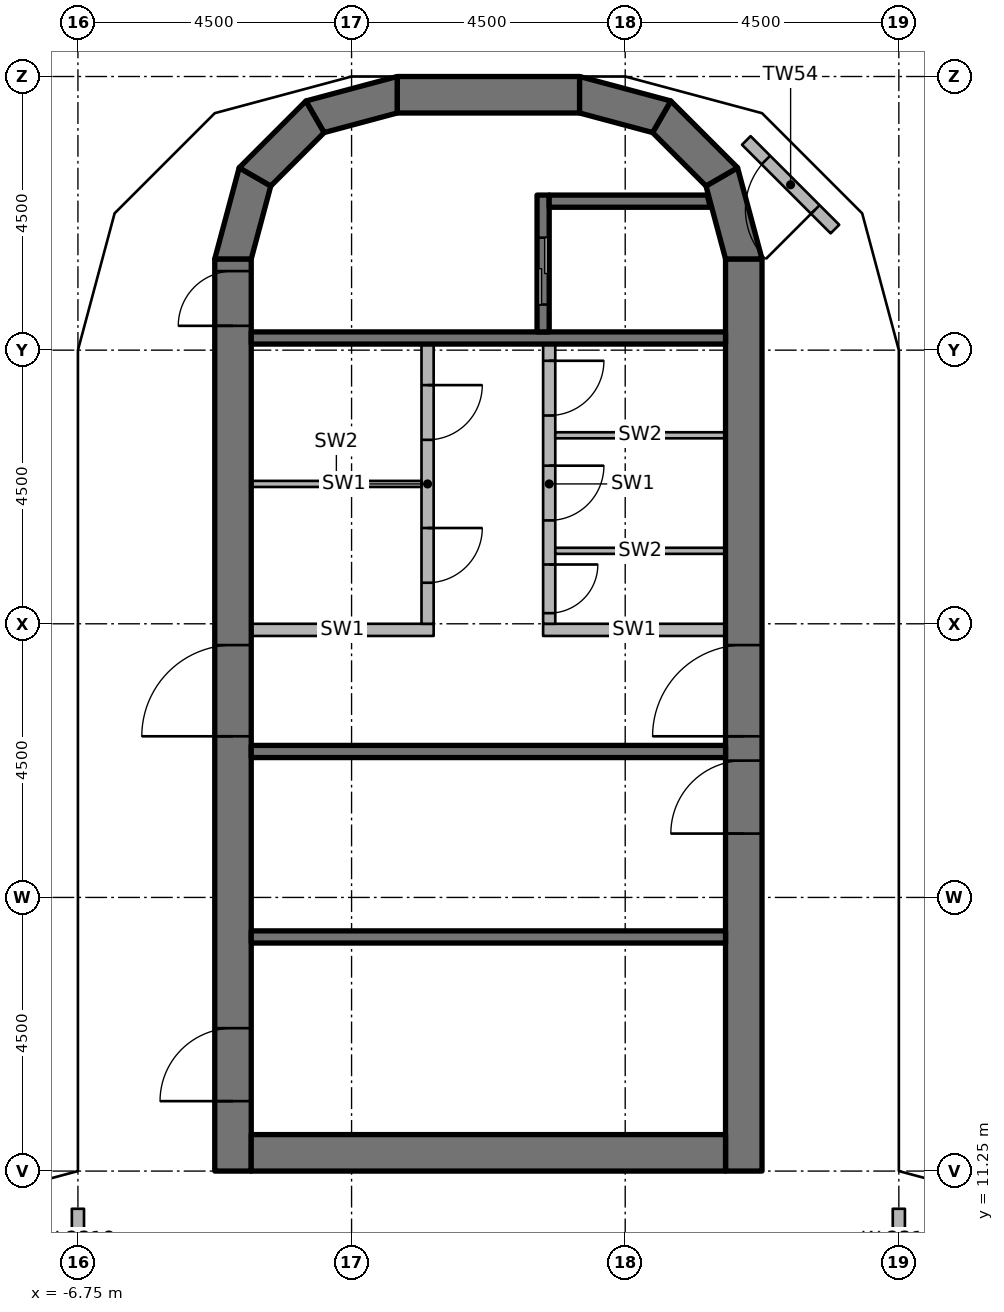
"""IFC4 building model, lengths in metres.
Left out: names, types, materials, properties, quantities, classifications, styles, units other than length and angle.
Written with IfcOpenShell. Run it as: python <this file> out.ifc"""

import sys

from ifc_helpers import new_model, si_unit, direction, frame, frame_2d, origin, origin_2d, place, context, subcontext, project, spatial, polyline, rectangle, outline, extrude, element, fill, save


model = new_model("IFC4")
c1 = context("Model", 3, precision=1e-05, world=origin(), true_north=direction((0.0, 1.0)))
c2 = subcontext(c1, "Body", "Model", "MODEL_VIEW")
j1 = project(units=[si_unit("LENGTHUNIT", "METRE"), si_unit("PLANEANGLEUNIT", "RADIAN")], contexts=[c1])
p1 = place(None, origin())
s1 = spatial("IfcSite", under=j1, at=p1, CompositionType="ELEMENT")
p2 = place(p1, origin())
s2 = spatial("IfcBuilding", under=s1, at=p2, CompositionType="ELEMENT")
p3 = place(p2, frame((0.0, 0.0, 218.2)))
s3 = spatial("IfcBuildingStorey", under=s2, at=p3, CompositionType="ELEMENT", Elevation=218.2)
for number, where, z_axis, x_axis in (
    (1, (-6.25, 10.75, 0.0), (0.0, 0.0, 1.0), (1.0, 0.0, 0.0)),
    (2, (-6.25, 15.75, 0.0), (0.0, 0.0, 1.0), (1.0, 0.0, 0.0)),
    (3, (-6.25, 20.25, 0.0), (0.0, 0.0, 1.0), (1.0, 0.0, 0.0)),
    (4, (-6.25, 24.65, 0.0), (0.0, 0.0, 1.0), (1.0, 0.0, 0.0)),
    (5, (6.25, 10.75, 0.0), (0.0, 0.0, 1.0), (1.0, 0.0, 0.0)),
    (6, (6.25, 15.75, 0.0), (0.0, 0.0, 1.0), (1.0, 0.0, 0.0)),
    (7, (6.25, 20.25, 0.0), (0.0, 0.0, 1.0), (1.0, 0.0, 0.0)),
    (8, (6.25, 24.65, 0.0), (0.0, 0.0, 1.0), (1.0, 0.0, 0.0)),
):
    element("IfcColumn", number, at=place(p3, frame(where, z_axis=z_axis, x_axis=x_axis)), inside=s3, PredefinedType="COLUMN", context=c2, shape_type="SweptSolid", body=[
        extrude(rectangle(XDim=0.7, YDim=0.7, at=origin_2d()), origin(), (0.0, 0.0, 1.0), 3.65),
    ])
p4 = place(p3, frame((-4.2, 11.25, 0.0), z_axis=(0.0, 0.0, 1.0), x_axis=(0.0, 1.0, 0.0)))
e9 = element("IfcWall", 9, at=p4, inside=s3, PredefinedType="SHEAR", context=c2, shape_type="SweptSolid", body=[
    extrude(rectangle(XDim=15.0, YDim=0.6, at=frame_2d((7.5, 0.0))), origin(), (0.0, 0.0, 1.0), 3.8),
])
p5 = place(p4, frame((7.15, 0.0, 0.0)))
e10 = element("IfcOpeningElement", 10, at=p5, cuts=e9, PredefinedType="OPENING", context=c2, shape_type="SweptSolid", body=[
    extrude(rectangle(XDim=1.5, YDim=2.3, at=frame_2d((0.75, 1.15))), frame((0.0, 0.31, 0.0), z_axis=(0.0, -1.0, 0.0), x_axis=(1.0, 0.0, 0.0)), (0.0, 0.0, 1.0), 0.62),
])
p6 = place(p4, frame((13.9, 0.0, 0.0)))
e11 = element("IfcOpeningElement", 11, at=p6, cuts=e9, PredefinedType="OPENING", context=c2, shape_type="SweptSolid", body=[
    extrude(rectangle(XDim=0.9, YDim=2.1, at=frame_2d((0.45, 1.05))), frame((0.0, 0.31, 0.0), z_axis=(0.0, -1.0, 0.0), x_axis=(1.0, 0.0, 0.0)), (0.0, 0.0, 1.0), 0.62),
])
p7 = place(p4, frame((1.15, 0.0, 0.0)))
e12 = element("IfcOpeningElement", 12, at=p7, cuts=e9, PredefinedType="OPENING", context=c2, shape_type="SweptSolid", body=[
    extrude(rectangle(XDim=1.2, YDim=2.1, at=frame_2d((0.6, 1.05))), frame((0.0, 0.31, 0.0), z_axis=(0.0, -1.0, 0.0), x_axis=(1.0, 0.0, 0.0)), (0.0, 0.0, 1.0), 0.62),
])
p8 = place(p3, frame((4.2, 11.25, 0.0), z_axis=(0.0, 0.0, 1.0), x_axis=(0.0, 1.0, 0.0)))
e13 = element("IfcWall", 13, at=p8, inside=s3, PredefinedType="SHEAR", context=c2, shape_type="SweptSolid", body=[
    extrude(rectangle(XDim=15.0, YDim=0.6, at=frame_2d((7.5, 0.0))), origin(), (0.0, 0.0, 1.0), 3.8),
])
p9 = place(p8, frame((7.15, 0.0, 0.0)))
e14 = element("IfcOpeningElement", 14, at=p9, cuts=e13, PredefinedType="OPENING", context=c2, shape_type="SweptSolid", body=[
    extrude(rectangle(XDim=1.5, YDim=2.3, at=frame_2d((0.75, 1.15))), frame((0.0, 0.31, 0.0), z_axis=(0.0, -1.0, 0.0), x_axis=(1.0, 0.0, 0.0)), (0.0, 0.0, 1.0), 0.62),
])
p10 = place(p8, frame((5.55, 0.0, 0.0)))
e15 = element("IfcOpeningElement", 15, at=p10, cuts=e13, PredefinedType="OPENING", context=c2, shape_type="SweptSolid", body=[
    extrude(rectangle(XDim=1.2, YDim=2.1, at=frame_2d((0.6, 1.05))), frame((0.0, 0.31, 0.0), z_axis=(0.0, -1.0, 0.0), x_axis=(1.0, 0.0, 0.0)), (0.0, 0.0, 1.0), 0.62),
])
p11 = place(p3, frame((-3.9, 11.55, 0.0), z_axis=(0.0, 0.0, 1.0), x_axis=(1.0, 0.0, 0.0)))
e16 = element("IfcWall", 16, at=p11, inside=s3, PredefinedType="SHEAR", context=c2, shape_type="SweptSolid", body=[
    extrude(rectangle(XDim=7.8, YDim=0.6, at=frame_2d((3.9, 0.0))), origin(), (0.0, 0.0, 1.0), 3.8),
])
p12 = place(p3, frame((-1.5, 28.95, 0.0), z_axis=(0.0, 0.0, 1.0), x_axis=(1.0, 0.0, 0.0)))
e17 = element("IfcWall", 17, at=p12, inside=s3, PredefinedType="SHEAR", context=c2, shape_type="SweptSolid", body=[
    extrude(rectangle(XDim=3.0, YDim=0.6, at=frame_2d((1.5, 0.0))), origin(), (0.0, 0.0, 1.0), 3.8),
])
p13 = place(p3, origin())
e18 = element("IfcWall", 18, at=p13, inside=s3, PredefinedType="SHEAR", context=c2, shape_type="SweptSolid", body=[
    extrude(outline(polyline([(-4.5, 26.25), (-4.098, 27.75), (-3.579, 27.45), (-3.9, 26.25), (-4.5, 26.25)])), origin(), (0.0, 0.0, 1.0), 3.8),
])
p14 = place(p3, origin())
e19 = element("IfcWall", 19, at=p14, inside=s3, PredefinedType="SHEAR", context=c2, shape_type="SweptSolid", body=[
    extrude(outline(polyline([(-4.098, 27.75), (-3.0, 28.848), (-2.7, 28.329), (-3.579, 27.45), (-4.098, 27.75)])), origin(), (0.0, 0.0, 1.0), 3.8),
])
p15 = place(p3, origin())
e20 = element("IfcWall", 20, at=p15, inside=s3, PredefinedType="SHEAR", context=c2, shape_type="SweptSolid", body=[
    extrude(outline(polyline([(-3.0, 28.848), (-1.5, 29.25), (-1.5, 28.65), (-2.7, 28.329), (-3.0, 28.848)])), origin(), (0.0, 0.0, 1.0), 3.8),
])
p16 = place(p3, origin())
e21 = element("IfcWall", 21, at=p16, inside=s3, PredefinedType="SHEAR", context=c2, shape_type="SweptSolid", body=[
    extrude(outline(polyline([(4.5, 26.25), (4.098, 27.75), (3.579, 27.45), (3.9, 26.25), (4.5, 26.25)])), origin(), (0.0, 0.0, 1.0), 3.8),
])
p17 = place(p3, origin())
e22 = element("IfcWall", 22, at=p17, inside=s3, PredefinedType="SHEAR", context=c2, shape_type="SweptSolid", body=[
    extrude(outline(polyline([(4.098, 27.75), (3.0, 28.848), (2.7, 28.329), (3.579, 27.45), (4.098, 27.75)])), origin(), (0.0, 0.0, 1.0), 3.8),
])
p18 = place(p3, origin())
e23 = element("IfcWall", 23, at=p18, inside=s3, PredefinedType="SHEAR", context=c2, shape_type="SweptSolid", body=[
    extrude(outline(polyline([(3.0, 28.848), (1.5, 29.25), (1.5, 28.65), (2.7, 28.329), (3.0, 28.848)])), origin(), (0.0, 0.0, 1.0), 3.8),
])
p19 = place(p3, frame((5.699, 26.741, 0.0), z_axis=(0.0, 0.0, 1.0), x_axis=(-0.707106781187, 0.707106781187, 0.0)))
e24 = element("IfcWall", 24, at=p19, inside=s3, PredefinedType="SOLIDWALL", context=c2, shape_type="SweptSolid", body=[
    extrude(rectangle(XDim=2.061, YDim=0.2, at=frame_2d((1.031, 0.0))), origin(), (0.0, 0.0, 1.0), 2.75),
])
p20 = place(p19, frame((0.456, 0.0, 0.0)))
e25 = element("IfcOpeningElement", 25, at=p20, cuts=e24, PredefinedType="OPENING", context=c2, shape_type="SweptSolid", body=[
    extrude(rectangle(XDim=1.15, YDim=2.4, at=frame_2d((0.575, 1.2))), frame((0.0, 0.11, 0.0), z_axis=(0.0, -1.0, 0.0), x_axis=(1.0, 0.0, 0.0)), (0.0, 0.0, 1.0), 0.22),
])
p21 = place(p3, frame((-3.9, 24.95, 0.0), z_axis=(0.0, 0.0, 1.0), x_axis=(1.0, 0.0, 0.0)))
e26 = element("IfcWall", 26, at=p21, inside=s3, PredefinedType="SHEAR", context=c2, shape_type="SweptSolid", body=[
    extrude(rectangle(XDim=7.8, YDim=0.2, at=frame_2d((3.9, 0.0))), origin(), (0.0, 0.0, 1.0), 3.65),
])
p22 = place(p3, frame((0.9, 27.3, 0.0), z_axis=(0.0, 0.0, 1.0), x_axis=(0.0, -1.0, 0.0)))
e27 = element("IfcWall", 27, at=p22, inside=s3, PredefinedType="SHEAR", context=c2, shape_type="SweptSolid", body=[
    extrude(rectangle(XDim=2.25, YDim=0.2, at=frame_2d((1.125, 0.0))), origin(), (0.0, 0.0, 1.0), 3.65),
])
p23 = place(p22, frame((0.7, 0.0, 0.0)))
e28 = element("IfcOpeningElement", 28, at=p23, cuts=e27, PredefinedType="OPENING", context=c2, shape_type="SweptSolid", body=[
    extrude(rectangle(XDim=1.1, YDim=2.3, at=frame_2d((0.55, 1.15))), frame((0.0, 0.11, 0.0), z_axis=(0.0, -1.0, 0.0), x_axis=(1.0, 0.0, 0.0)), (0.0, 0.0, 1.0), 0.22),
])
p24 = place(p3, origin())
e29 = element("IfcWall", 29, at=p24, inside=s3, PredefinedType="SHEAR", context=c2, shape_type="SweptSolid", body=[
    extrude(outline(polyline([(1.0, 27.1), (3.651, 27.1), (3.597, 27.3), (1.0, 27.3), (1.0, 27.1)])), origin(), (0.0, 0.0, 1.0), 3.65),
])
for number, where, z_axis, x_axis in (
    (30, (-3.9, 18.15, 0.0), (0.0, 0.0, 1.0), (1.0, 0.0, 0.0)),
    (31, (-3.9, 15.1, 0.0), (0.0, 0.0, 1.0), (1.0, 0.0, 0.0)),
):
    element("IfcWall", number, at=place(p3, frame(where, z_axis=z_axis, x_axis=x_axis)), inside=s3, PredefinedType="SHEAR", context=c2, shape_type="SweptSolid", body=[
        extrude(rectangle(XDim=7.8, YDim=0.2, at=frame_2d((3.9, 0.0))), origin(), (0.0, 0.0, 1.0), 3.65),
    ])
p25 = place(p3, frame((-3.9, 20.15, 0.0), z_axis=(0.0, 0.0, 1.0), x_axis=(1.0, 0.0, 0.0)))
e32 = element("IfcWall", 32, at=p25, inside=s3, PredefinedType="PARTITIONING", context=c2, shape_type="SweptSolid", body=[
    extrude(rectangle(XDim=3.0, YDim=0.2, at=frame_2d((1.5, 0.0))), origin(), (0.0, 0.0, 1.0), 3.65),
])
p26 = place(p3, frame((-1.0, 24.85, 0.0), z_axis=(0.0, 0.0, 1.0), x_axis=(0.0, -1.0, 0.0)))
e33 = element("IfcWall", 33, at=p26, inside=s3, PredefinedType="PARTITIONING", context=c2, shape_type="SweptSolid", body=[
    extrude(rectangle(XDim=4.6, YDim=0.2, at=frame_2d((2.3, 0.0))), origin(), (0.0, 0.0, 1.0), 3.65),
])
p27 = place(p26, frame((0.675, 0.0, 0.0)))
e34 = element("IfcOpeningElement", 34, at=p27, cuts=e33, PredefinedType="OPENING", context=c2, shape_type="SweptSolid", body=[
    extrude(rectangle(XDim=0.9, YDim=2.1, at=frame_2d((0.45, 1.05))), frame((0.0, 0.11, 0.0), z_axis=(0.0, -1.0, 0.0), x_axis=(1.0, 0.0, 0.0)), (0.0, 0.0, 1.0), 0.22),
])
p28 = place(p26, frame((3.025, 0.0, 0.0)))
e35 = element("IfcOpeningElement", 35, at=p28, cuts=e33, PredefinedType="OPENING", context=c2, shape_type="SweptSolid", body=[
    extrude(rectangle(XDim=0.9, YDim=2.1, at=frame_2d((0.45, 1.05))), frame((0.0, 0.11, 0.0), z_axis=(0.0, -1.0, 0.0), x_axis=(1.0, 0.0, 0.0)), (0.0, 0.0, 1.0), 0.22),
])
p29 = place(p3, frame((0.9, 20.15, 0.0), z_axis=(0.0, 0.0, 1.0), x_axis=(1.0, 0.0, 0.0)))
e36 = element("IfcWall", 36, at=p29, inside=s3, PredefinedType="PARTITIONING", context=c2, shape_type="SweptSolid", body=[
    extrude(rectangle(XDim=3.0, YDim=0.2, at=frame_2d((1.5, 0.0))), origin(), (0.0, 0.0, 1.0), 3.65),
])
p30 = place(p3, frame((1.0, 24.85, 0.0), z_axis=(0.0, 0.0, 1.0), x_axis=(0.0, -1.0, 0.0)))
e37 = element("IfcWall", 37, at=p30, inside=s3, PredefinedType="PARTITIONING", context=c2, shape_type="SweptSolid", body=[
    extrude(rectangle(XDim=4.6, YDim=0.2, at=frame_2d((2.3, 0.0))), origin(), (0.0, 0.0, 1.0), 3.65),
])
p31 = place(p30, frame((0.275, 0.0, 0.0)))
e38 = element("IfcOpeningElement", 38, at=p31, cuts=e37, PredefinedType="OPENING", context=c2, shape_type="SweptSolid", body=[
    extrude(rectangle(XDim=0.9, YDim=2.1, at=frame_2d((0.45, 1.05))), frame((0.0, 0.11, 0.0), z_axis=(0.0, -1.0, 0.0), x_axis=(1.0, 0.0, 0.0)), (0.0, 0.0, 1.0), 0.22),
])
p32 = place(p30, frame((2.0, 0.0, 0.0)))
e39 = element("IfcOpeningElement", 39, at=p32, cuts=e37, PredefinedType="OPENING", context=c2, shape_type="SweptSolid", body=[
    extrude(rectangle(XDim=0.9, YDim=2.1, at=frame_2d((0.45, 1.05))), frame((0.0, 0.11, 0.0), z_axis=(0.0, -1.0, 0.0), x_axis=(1.0, 0.0, 0.0)), (0.0, 0.0, 1.0), 0.22),
])
p33 = place(p30, frame((3.625, 0.0, 0.0)))
e40 = element("IfcOpeningElement", 40, at=p33, cuts=e37, PredefinedType="OPENING", context=c2, shape_type="SweptSolid", body=[
    extrude(rectangle(XDim=0.8, YDim=2.1, at=frame_2d((0.4, 1.05))), frame((0.0, 0.11, 0.0), z_axis=(0.0, -1.0, 0.0), x_axis=(1.0, 0.0, 0.0)), (0.0, 0.0, 1.0), 0.22),
])
for number, where, z_axis, x_axis in (
    (41, (-3.9, 22.55, 0.0), (0.0, 0.0, 1.0), (1.0, 0.0, 0.0)),
    (42, (1.1, 23.35, 0.0), (0.0, 0.0, 1.0), (1.0, 0.0, 0.0)),
    (43, (1.1, 21.45, 0.0), (0.0, 0.0, 1.0), (1.0, 0.0, 0.0)),
):
    element("IfcWall", number, at=place(p3, frame(where, z_axis=z_axis, x_axis=x_axis)), inside=s3, PredefinedType="PARTITIONING", context=c2, shape_type="SweptSolid", body=[
        extrude(rectangle(XDim=2.8, YDim=0.1, at=frame_2d((1.4, 0.0))), origin(), (0.0, 0.0, 1.0), 3.65),
    ])
p34 = place(p3, frame((6.75, 10.63, 0.0), z_axis=(0.0, 0.0, 1.0), x_axis=(0.0, -1.0, 0.0)))
e44 = element("IfcWall", 44, at=p34, inside=s3, PredefinedType="PARTITIONING", context=c2, shape_type="SweptSolid", body=[
    extrude(rectangle(XDim=3.78, YDim=0.2, at=frame_2d((1.89, 0.0))), origin(), (0.0, 0.0, 1.0), 2.75),
])
p35 = place(p34, frame((1.44, 0.0, 0.0)))
e45 = element("IfcOpeningElement", 45, at=p35, cuts=e44, PredefinedType="OPENING", context=c2, shape_type="SweptSolid", body=[
    extrude(rectangle(XDim=0.9, YDim=2.1, at=frame_2d((0.45, 1.05))), frame((0.0, 0.11, 0.0), z_axis=(0.0, -1.0, 0.0), x_axis=(1.0, 0.0, 0.0)), (0.0, 0.0, 1.0), 0.22),
])
p36 = place(p3, frame((-6.75, 6.85, 0.0), z_axis=(0.0, 0.0, 1.0), x_axis=(0.0, 1.0, 0.0)))
e46 = element("IfcWall", 46, at=p36, inside=s3, PredefinedType="PARTITIONING", context=c2, shape_type="SweptSolid", body=[
    extrude(rectangle(XDim=3.78, YDim=0.2, at=frame_2d((1.89, 0.0))), origin(), (0.0, 0.0, 1.0), 2.75),
])
p37 = place(p36, frame((1.44, 0.0, 0.0)))
e47 = element("IfcOpeningElement", 47, at=p37, cuts=e46, PredefinedType="OPENING", context=c2, shape_type="SweptSolid", body=[
    extrude(rectangle(XDim=0.9, YDim=2.1, at=frame_2d((0.45, 1.05))), frame((0.0, 0.11, 0.0), z_axis=(0.0, -1.0, 0.0), x_axis=(1.0, 0.0, 0.0)), (0.0, 0.0, 1.0), 0.22),
])
p38 = place(p20, origin())
e48 = element("IfcDoor", 48, at=p38, inside=s3, OperationType="SINGLE_SWING_LEFT", PredefinedType="DOOR", context=c2, shape_type="SweptSolid", body=[
    extrude(rectangle(XDim=1.15, YDim=2.4, at=frame_2d((0.575, 1.2))), frame((0.0, 0.025, 0.0), z_axis=(0.0, -1.0, 0.0), x_axis=(1.0, 0.0, 0.0)), (0.0, 0.0, 1.0), 0.05),
])
fill(e25, e48)
p39 = place(p5, origin())
e49 = element("IfcDoor", 49, at=p39, inside=s3, OperationType="DOUBLE_DOOR_SINGLE_SWING", PredefinedType="DOOR", context=c2, shape_type="SweptSolid", body=[
    extrude(rectangle(XDim=1.5, YDim=2.3, at=frame_2d((0.75, 1.15))), frame((0.0, 0.025, 0.0), z_axis=(0.0, -1.0, 0.0), x_axis=(1.0, 0.0, 0.0)), (0.0, 0.0, 1.0), 0.05),
])
fill(e10, e49)
p40 = place(p9, origin())
e50 = element("IfcDoor", 50, at=p40, inside=s3, OperationType="DOUBLE_DOOR_SINGLE_SWING", PredefinedType="DOOR", context=c2, shape_type="SweptSolid", body=[
    extrude(rectangle(XDim=1.5, YDim=2.3, at=frame_2d((0.75, 1.15))), frame((0.0, 0.025, 0.0), z_axis=(0.0, -1.0, 0.0), x_axis=(1.0, 0.0, 0.0)), (0.0, 0.0, 1.0), 0.05),
])
fill(e14, e50)
p41 = place(p6, origin())
e51 = element("IfcDoor", 51, at=p41, inside=s3, OperationType="SINGLE_SWING_RIGHT", PredefinedType="DOOR", context=c2, shape_type="SweptSolid", body=[
    extrude(rectangle(XDim=0.9, YDim=2.1, at=frame_2d((0.45, 1.05))), frame((0.0, 0.025, 0.0), z_axis=(0.0, -1.0, 0.0), x_axis=(1.0, 0.0, 0.0)), (0.0, 0.0, 1.0), 0.05),
])
fill(e11, e51)
p42 = place(p10, origin())
e52 = element("IfcDoor", 52, at=p42, inside=s3, OperationType="SINGLE_SWING_LEFT", PredefinedType="DOOR", context=c2, shape_type="SweptSolid", body=[
    extrude(rectangle(XDim=1.2, YDim=2.1, at=frame_2d((0.6, 1.05))), frame((0.0, 0.025, 0.0), z_axis=(0.0, -1.0, 0.0), x_axis=(1.0, 0.0, 0.0)), (0.0, 0.0, 1.0), 0.05),
])
fill(e15, e52)
p43 = place(p7, origin())
e53 = element("IfcDoor", 53, at=p43, inside=s3, OperationType="SINGLE_SWING_RIGHT", PredefinedType="DOOR", context=c2, shape_type="SweptSolid", body=[
    extrude(rectangle(XDim=1.2, YDim=2.1, at=frame_2d((0.6, 1.05))), frame((0.0, 0.025, 0.0), z_axis=(0.0, -1.0, 0.0), x_axis=(1.0, 0.0, 0.0)), (0.0, 0.0, 1.0), 0.05),
])
fill(e12, e53)
p44 = place(p23, origin())
e54 = element("IfcDoor", 54, at=p44, inside=s3, OperationType="DOUBLE_DOOR_SLIDING", PredefinedType="DOOR", context=c2, shape_type="SweptSolid", body=[
    extrude(rectangle(XDim=1.1, YDim=2.3, at=frame_2d((0.55, 1.15))), frame((0.0, 0.025, 0.0), z_axis=(0.0, -1.0, 0.0), x_axis=(1.0, 0.0, 0.0)), (0.0, 0.0, 1.0), 0.05),
])
fill(e28, e54)
p45 = place(p27, origin())
e55 = element("IfcDoor", 55, at=p45, inside=s3, OperationType="SINGLE_SWING_LEFT", PredefinedType="DOOR", context=c2, shape_type="SweptSolid", body=[
    extrude(rectangle(XDim=0.9, YDim=2.1, at=frame_2d((0.45, 1.05))), frame((0.0, 0.025, 0.0), z_axis=(0.0, -1.0, 0.0), x_axis=(1.0, 0.0, 0.0)), (0.0, 0.0, 1.0), 0.05),
])
fill(e34, e55)
p46 = place(p28, origin())
e56 = element("IfcDoor", 56, at=p46, inside=s3, OperationType="SINGLE_SWING_RIGHT", PredefinedType="DOOR", context=c2, shape_type="SweptSolid", body=[
    extrude(rectangle(XDim=0.9, YDim=2.1, at=frame_2d((0.45, 1.05))), frame((0.0, 0.025, 0.0), z_axis=(0.0, -1.0, 0.0), x_axis=(1.0, 0.0, 0.0)), (0.0, 0.0, 1.0), 0.05),
])
fill(e35, e56)
p47 = place(p31, origin())
e57 = element("IfcDoor", 57, at=p47, inside=s3, OperationType="SINGLE_SWING_LEFT", PredefinedType="DOOR", context=c2, shape_type="SweptSolid", body=[
    extrude(rectangle(XDim=0.9, YDim=2.1, at=frame_2d((0.45, 1.05))), frame((0.0, 0.025, 0.0), z_axis=(0.0, -1.0, 0.0), x_axis=(1.0, 0.0, 0.0)), (0.0, 0.0, 1.0), 0.05),
])
fill(e38, e57)
p48 = place(p32, origin())
e58 = element("IfcDoor", 58, at=p48, inside=s3, OperationType="SINGLE_SWING_LEFT", PredefinedType="DOOR", context=c2, shape_type="SweptSolid", body=[
    extrude(rectangle(XDim=0.9, YDim=2.1, at=frame_2d((0.45, 1.05))), frame((0.0, 0.025, 0.0), z_axis=(0.0, -1.0, 0.0), x_axis=(1.0, 0.0, 0.0)), (0.0, 0.0, 1.0), 0.05),
])
fill(e39, e58)
p49 = place(p33, origin())
e59 = element("IfcDoor", 59, at=p49, inside=s3, OperationType="SINGLE_SWING_LEFT", PredefinedType="DOOR", context=c2, shape_type="SweptSolid", body=[
    extrude(rectangle(XDim=0.8, YDim=2.1, at=frame_2d((0.4, 1.05))), frame((0.0, 0.025, 0.0), z_axis=(0.0, -1.0, 0.0), x_axis=(1.0, 0.0, 0.0)), (0.0, 0.0, 1.0), 0.05),
])
fill(e40, e59)
save(model, sys.argv[1])
